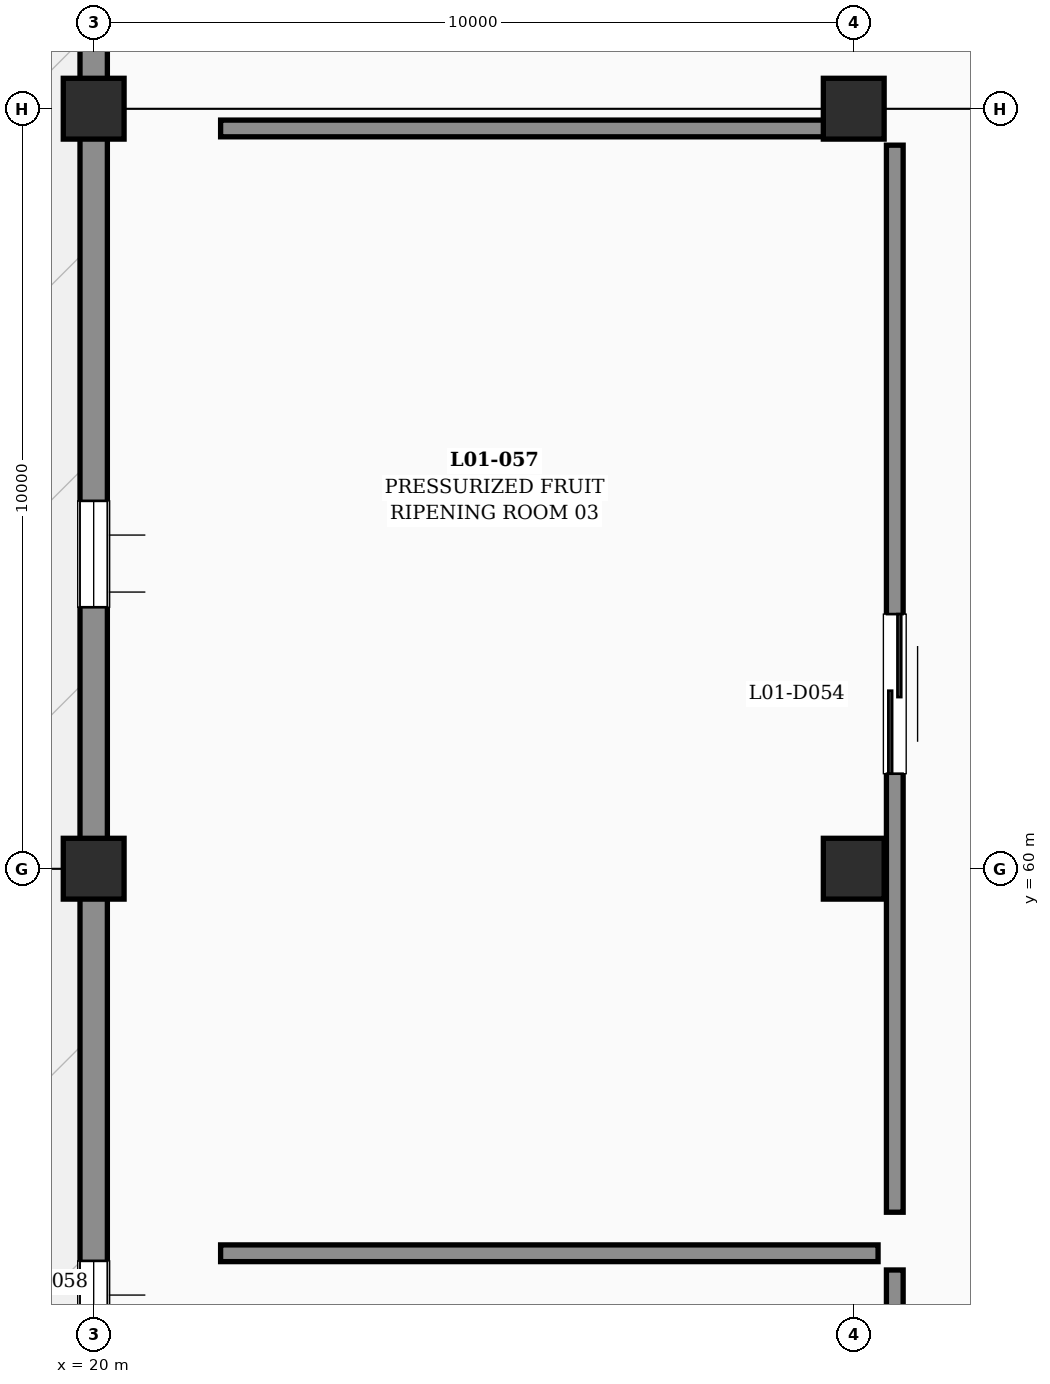
"""IFC4 building model, lengths in metres.
Left out: names, types, materials, properties, quantities, classifications, styles, units other than length and angle.
Written with IfcOpenShell. Run it as: python <this file> out.ifc"""

import sys

from ifc_helpers import new_model, si_unit, direction, frame, frame_2d, origin, origin_2d, place, context, subcontext, project, spatial, rectangle, extrude, element, fill, save


model = new_model("IFC4")
c1 = context("Model", 3, precision=1e-05, world=origin(), true_north=direction((0.0, 1.0)))
c2 = subcontext(c1, "Body", "Model", "MODEL_VIEW")
j1 = project(units=[si_unit("LENGTHUNIT", "METRE"), si_unit("PLANEANGLEUNIT", "RADIAN")], contexts=[c1])
p1 = place(None, origin())
s1 = spatial("IfcSite", under=j1, at=p1, CompositionType="ELEMENT")
p2 = place(p1, origin())
s2 = spatial("IfcBuilding", under=s1, at=p2, CompositionType="ELEMENT")
p3 = place(p2, frame((0.0, 0.0, 6.0)))
s3 = spatial("IfcBuildingStorey", under=s2, at=p3, CompositionType="ELEMENT", Elevation=6.0)
for number, where, z_axis, x_axis in (
    (1, (20.0, 60.0, 0.0), (0.0, 0.0, 1.0), (1.0, 0.0, 0.0)),
    (2, (20.0, 70.0, 0.0), (0.0, 0.0, 1.0), (1.0, 0.0, 0.0)),
    (3, (30.0, 60.0, 0.0), (0.0, 0.0, 1.0), (1.0, 0.0, 0.0)),
    (4, (30.0, 70.0, 0.0), (0.0, 0.0, 1.0), (1.0, 0.0, 0.0)),
):
    element("IfcColumn", number, at=place(p3, frame(where, z_axis=z_axis, x_axis=x_axis)), inside=s3, PredefinedType="COLUMN", context=c2, shape_type="SweptSolid", body=[
        extrude(rectangle(XDim=0.8, YDim=0.8, at=origin_2d()), origin(), (0.0, 0.0, 1.0), 4.8),
    ])
p4 = place(p3, frame((20.0, 50.24, 0.0), z_axis=(0.0, 0.0, 1.0), x_axis=(0.0, 1.0, 0.0)))
e5 = element("IfcWall", 5, at=p4, inside=s3, PredefinedType="SOLIDWALL", context=c2, shape_type="SweptSolid", body=[
    extrude(rectangle(XDim=9.52, YDim=0.36, at=frame_2d((4.76, 0.0))), origin(), (0.0, 0.0, 1.0), 3.61),
])
p5 = place(p4, frame((3.2, 0.0, 1.2)))
e6 = element("IfcOpeningElement", 6, at=p5, cuts=e5, PredefinedType="OPENING", context=c2, shape_type="SweptSolid", body=[
    extrude(rectangle(XDim=1.4, YDim=1.35, at=frame_2d((0.7, 0.675))), frame((0.0, 0.19, 0.0), z_axis=(0.0, -1.0, 0.0), x_axis=(1.0, 0.0, 0.0)), (0.0, 0.0, 1.0), 0.38),
])
p6 = place(p3, frame((20.0, 60.24, 0.0), z_axis=(0.0, 0.0, 1.0), x_axis=(0.0, 1.0, 0.0)))
e7 = element("IfcWall", 7, at=p6, inside=s3, PredefinedType="SOLIDWALL", context=c2, shape_type="SweptSolid", body=[
    extrude(rectangle(XDim=9.52, YDim=0.36, at=frame_2d((4.76, 0.0))), origin(), (0.0, 0.0, 1.0), 3.61),
])
p7 = place(p6, frame((3.2, 0.0, 1.2)))
e8 = element("IfcOpeningElement", 8, at=p7, cuts=e7, PredefinedType="OPENING", context=c2, shape_type="SweptSolid", body=[
    extrude(rectangle(XDim=1.4, YDim=1.35, at=frame_2d((0.7, 0.675))), frame((0.0, 0.19, 0.0), z_axis=(0.0, -1.0, 0.0), x_axis=(1.0, 0.0, 0.0)), (0.0, 0.0, 1.0), 0.38),
])
p8 = place(p3, frame((20.0, 70.24, 0.0), z_axis=(0.0, 0.0, 1.0), x_axis=(0.0, 1.0, 0.0)))
e9 = element("IfcWall", 9, at=p8, inside=s3, PredefinedType="SOLIDWALL", context=c2, shape_type="SweptSolid", body=[
    extrude(rectangle(XDim=9.52, YDim=0.36, at=frame_2d((4.76, 0.0))), origin(), (0.0, 0.0, 1.0), 3.61),
])
p9 = place(p8, frame((3.2, 0.0, 1.2)))
e10 = element("IfcOpeningElement", 10, at=p9, cuts=e9, PredefinedType="OPENING", context=c2, shape_type="SweptSolid", body=[
    extrude(rectangle(XDim=1.4, YDim=1.35, at=frame_2d((0.7, 0.675))), frame((0.0, 0.19, 0.0), z_axis=(0.0, -1.0, 0.0), x_axis=(1.0, 0.0, 0.0)), (0.0, 0.0, 1.0), 0.38),
])
p10 = place(p3, frame((21.67, 54.94, 0.0), z_axis=(0.0, 0.0, 1.0), x_axis=(1.0, 0.0, 0.0)))
e11 = element("IfcWall", 11, at=p10, inside=s3, PredefinedType="PARTITIONING", context=c2, shape_type="SweptSolid", body=[
    extrude(rectangle(XDim=8.65, YDim=0.22, at=frame_2d((4.325, 0.0))), origin(), (0.0, 0.0, 1.0), 3.51),
])
p11 = place(p3, frame((30.54, 54.72, 0.0), z_axis=(0.0, 0.0, 1.0), x_axis=(0.0, -1.0, 0.0)))
e12 = element("IfcWall", 12, at=p11, inside=s3, PredefinedType="PARTITIONING", context=c2, shape_type="SweptSolid", body=[
    extrude(rectangle(XDim=14.24, YDim=0.22, at=frame_2d((7.12, 0.0))), origin(), (0.0, 0.0, 1.0), 3.51),
])
p12 = place(p11, frame((6.27, 0.0, 0.0)))
e13 = element("IfcOpeningElement", 13, at=p12, cuts=e12, PredefinedType="OPENING", context=c2, shape_type="SweptSolid", body=[
    extrude(rectangle(XDim=2.1, YDim=2.4, at=frame_2d((1.05, 1.2))), frame((0.0, 0.12, 0.0), z_axis=(0.0, -1.0, 0.0), x_axis=(1.0, 0.0, 0.0)), (0.0, 0.0, 1.0), 0.24),
])
p13 = place(p3, frame((21.67, 69.74, 0.0), z_axis=(0.0, 0.0, 1.0), x_axis=(1.0, 0.0, 0.0)))
e14 = element("IfcWall", 14, at=p13, inside=s3, PredefinedType="PARTITIONING", context=c2, shape_type="SweptSolid", body=[
    extrude(rectangle(XDim=8.65, YDim=0.22, at=frame_2d((4.325, 0.0))), origin(), (0.0, 0.0, 1.0), 3.51),
])
p14 = place(p3, frame((30.54, 69.52, 0.0), z_axis=(0.0, 0.0, 1.0), x_axis=(0.0, -1.0, 0.0)))
e15 = element("IfcWall", 15, at=p14, inside=s3, PredefinedType="PARTITIONING", context=c2, shape_type="SweptSolid", body=[
    extrude(rectangle(XDim=14.04, YDim=0.22, at=frame_2d((7.02, 0.0))), origin(), (0.0, 0.0, 1.0), 3.51),
])
p15 = place(p14, frame((6.17, 0.0, 0.0)))
e16 = element("IfcOpeningElement", 16, at=p15, cuts=e15, PredefinedType="OPENING", context=c2, shape_type="SweptSolid", body=[
    extrude(rectangle(XDim=2.1, YDim=2.4, at=frame_2d((1.05, 1.2))), frame((0.0, 0.12, 0.0), z_axis=(0.0, -1.0, 0.0), x_axis=(1.0, 0.0, 0.0)), (0.0, 0.0, 1.0), 0.24),
])
p16 = place(p5, origin())
e17 = element("IfcWindow", 17, at=p16, inside=s3, PartitioningType="SINGLE_PANEL", PredefinedType="WINDOW", context=c2, shape_type="SweptSolid", body=[
    extrude(rectangle(XDim=1.4, YDim=1.35, at=frame_2d((0.7, 0.675))), frame((0.0, 0.03, 0.0), z_axis=(0.0, -1.0, 0.0), x_axis=(1.0, 0.0, 0.0)), (0.0, 0.0, 1.0), 0.06),
])
fill(e6, e17)
p17 = place(p7, origin())
e18 = element("IfcWindow", 18, at=p17, inside=s3, PartitioningType="SINGLE_PANEL", PredefinedType="WINDOW", context=c2, shape_type="SweptSolid", body=[
    extrude(rectangle(XDim=1.4, YDim=1.35, at=frame_2d((0.7, 0.675))), frame((0.0, 0.03, 0.0), z_axis=(0.0, -1.0, 0.0), x_axis=(1.0, 0.0, 0.0)), (0.0, 0.0, 1.0), 0.06),
])
fill(e8, e18)
p18 = place(p15, origin())
e19 = element("IfcDoor", 19, at=p18, inside=s3, OperationType="DOUBLE_DOOR_SLIDING", PredefinedType="DOOR", context=c2, shape_type="SweptSolid", body=[
    extrude(rectangle(XDim=2.1, YDim=2.4, at=frame_2d((1.05, 1.2))), frame((0.0, 0.025, 0.0), z_axis=(0.0, -1.0, 0.0), x_axis=(1.0, 0.0, 0.0)), (0.0, 0.0, 1.0), 0.05),
])
fill(e16, e19)
save(model, sys.argv[1])
